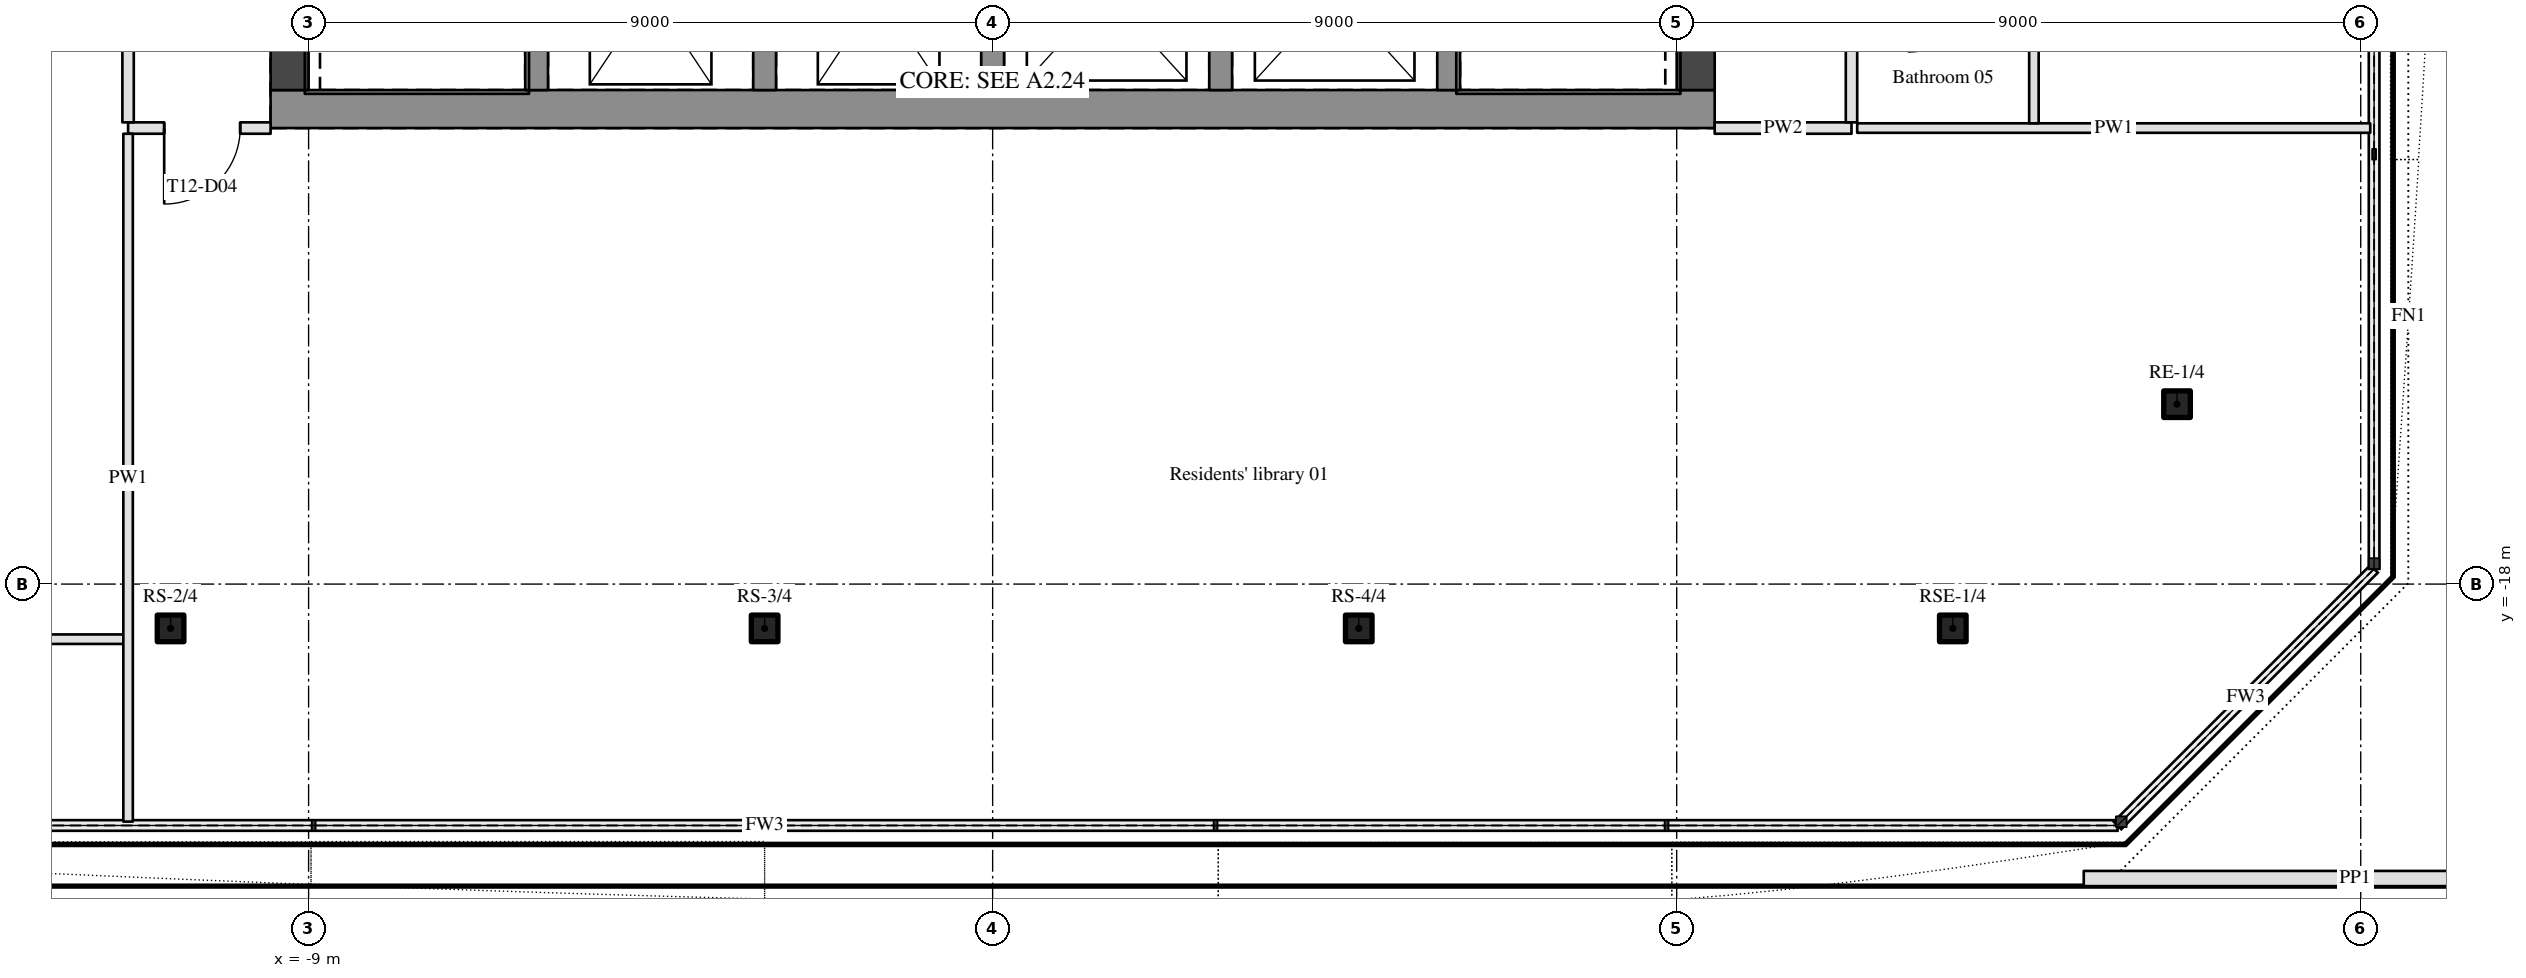
"""IFC4 building model, lengths in metres.
Left out: names, types, materials, properties, quantities, classifications, styles, units other than length and angle.
Written with IfcOpenShell. Run it as: python <this file> out.ifc"""

import sys

from ifc_helpers import new_model, si_unit, direction, frame, frame_2d, origin, origin_2d, place, context, subcontext, project, spatial, rectangle, hollow_rectangle, extrude, element, fill, save


model = new_model("IFC4")
c1 = context("Model", 3, precision=1e-05, world=origin(), true_north=direction((0.0, 1.0)))
c2 = subcontext(c1, "Body", "Model", "MODEL_VIEW")
j1 = project(units=[si_unit("LENGTHUNIT", "METRE"), si_unit("PLANEANGLEUNIT", "RADIAN")], contexts=[c1])
p1 = place(None, origin())
s1 = spatial("IfcSite", under=j1, at=p1, CompositionType="ELEMENT")
p2 = place(p1, origin())
s2 = spatial("IfcBuilding", under=s1, at=p2, CompositionType="ELEMENT")
p3 = place(p2, frame((0.0, 0.0, 172.2)))
s3 = spatial("IfcBuildingStorey", under=s2, at=p3, CompositionType="ELEMENT", Elevation=172.2)
for number, where, z_axis, x_axis in (
    (1, (-10.816, -18.583, 0.0), (0.0, 0.0, 1.0), (1.0, 0.0, 0.0)),
    (2, (-3.0, -18.583, 0.0), (0.0, 0.0, 1.0), (1.0, 0.0, 0.0)),
    (3, (4.817, -18.583, 0.0), (0.0, 0.0, 1.0), (1.0, 0.0, 0.0)),
    (4, (12.633, -18.583, 0.0), (0.0, 0.0, 1.0), (1.0, 0.0, 0.0)),
    (5, (15.583, -15.633, 0.0), (0.0, 0.0, 1.0), (1.0, 0.0, 0.0)),
):
    element("IfcColumn", number, at=place(p3, frame(where, z_axis=z_axis, x_axis=x_axis)), inside=s3, PredefinedType="COLUMN", context=c2, shape_type="SweptSolid", body=[
        extrude(hollow_rectangle(XDim=0.35, YDim=0.35, WallThickness=0.02, InnerFilletRadius=0.03, OuterFilletRadius=0.05, at=origin_2d()), origin(), (0.0, 0.0, 1.0), 3.15),
    ])
p4 = place(p3, frame((-9.5, -11.75, 0.0), z_axis=(0.0, 0.0, 1.0), x_axis=(1.0, 0.0, 0.0)))
e6 = element("IfcWall", 6, at=p4, inside=s3, PredefinedType="SHEAR", context=c2, shape_type="SweptSolid", body=[
    extrude(rectangle(XDim=19.0, YDim=0.5, at=frame_2d((9.5, 0.0))), origin(), (0.0, 0.0, 1.0), 3.15),
])
p5 = place(p3, frame((-9.25, -11.5, 0.0), z_axis=(0.0, 0.0, 1.0), x_axis=(0.0, 1.0, 0.0)))
e7 = element("IfcWall", 7, at=p5, inside=s3, PredefinedType="SHEAR", context=c2, shape_type="SweptSolid", body=[
    extrude(rectangle(XDim=11.65, YDim=0.5, at=frame_2d((5.825, 0.0))), origin(), (0.0, 0.0, 1.0), 3.15),
])
p6 = place(p5, frame((9.4, 0.0, 0.0)))
e8 = element("IfcOpeningElement", 8, at=p6, cuts=e7, PredefinedType="OPENING", context=c2, shape_type="SweptSolid", body=[
    extrude(rectangle(XDim=1.8, YDim=2.1, at=frame_2d((0.9, 1.05))), frame((0.0, 0.26, 0.0), z_axis=(0.0, -1.0, 0.0), x_axis=(1.0, 0.0, 0.0)), (0.0, 0.0, 1.0), 0.52),
])
p7 = place(p3, frame((9.25, -11.5, 0.0), z_axis=(0.0, 0.0, 1.0), x_axis=(0.0, 1.0, 0.0)))
e9 = element("IfcWall", 9, at=p7, inside=s3, PredefinedType="SHEAR", context=c2, shape_type="SweptSolid", body=[
    extrude(rectangle(XDim=11.65, YDim=0.5, at=frame_2d((5.825, 0.0))), origin(), (0.0, 0.0, 1.0), 3.15),
])
p8 = place(p7, frame((9.4, 0.0, 0.0)))
e10 = element("IfcOpeningElement", 10, at=p8, cuts=e9, PredefinedType="OPENING", context=c2, shape_type="SweptSolid", body=[
    extrude(rectangle(XDim=1.8, YDim=2.1, at=frame_2d((0.9, 1.05))), frame((0.0, 0.26, 0.0), z_axis=(0.0, -1.0, 0.0), x_axis=(1.0, 0.0, 0.0)), (0.0, 0.0, 1.0), 0.52),
])
p9 = place(p3, frame((14.356, -21.874, 0.0), z_axis=(0.0, 0.0, 1.0), x_axis=(1.0, 0.0, 0.0)))
e11 = element("IfcWall", 11, at=p9, inside=s3, PredefinedType="PARAPET", context=c2, shape_type="SweptSolid", body=[
    extrude(rectangle(XDim=7.14, YDim=0.2, at=frame_2d((3.57, 0.0))), origin(), (0.0, 0.0, 1.0), 1.0),
])
p10 = place(p3, frame((-11.438, -18.725, 0.0), z_axis=(0.0, 0.0, 1.0), x_axis=(-1.0, 0.0, 0.0)))
e12 = element("IfcWall", 12, at=p10, inside=s3, PredefinedType="PARTITIONING", context=c2, shape_type="SweptSolid", body=[
    extrude(rectangle(XDim=6.5, YDim=0.125, at=frame_2d((3.25, 0.0))), origin(), (0.0, 0.0, 1.0), 2.21),
])
p11 = place(p10, frame((2.8, 0.0, 0.0)))
e13 = element("IfcOpeningElement", 13, at=p11, cuts=e12, PredefinedType="OPENING", context=c2, shape_type="SweptSolid", body=[
    extrude(rectangle(XDim=0.9, YDim=2.1, at=frame_2d((0.45, 1.05))), frame((0.0, 0.073, 0.0), z_axis=(0.0, -1.0, 0.0), x_axis=(1.0, 0.0, 0.0)), (0.0, 0.0, 1.0), 0.145),
])
p12 = place(p3, frame((-9.5, -12.0, 0.0), z_axis=(0.0, 0.0, 1.0), x_axis=(-1.0, 0.0, 0.0)))
e14 = element("IfcWall", 14, at=p12, inside=s3, PredefinedType="PARTITIONING", context=c2, shape_type="SweptSolid", body=[
    extrude(rectangle(XDim=1.875, YDim=0.15, at=frame_2d((0.938, 0.0))), origin(), (0.0, 0.0, 1.0), 2.21),
])
p13 = place(p12, frame((0.4, 0.0, 0.0)))
e15 = element("IfcOpeningElement", 15, at=p13, cuts=e14, PredefinedType="OPENING", context=c2, shape_type="SweptSolid", body=[
    extrude(rectangle(XDim=1.0, YDim=2.1, at=frame_2d((0.5, 1.05))), frame((0.0, 0.085, 0.0), z_axis=(0.0, -1.0, 0.0), x_axis=(1.0, 0.0, 0.0)), (0.0, 0.0, 1.0), 0.17),
])
p14 = place(p3, frame((9.5, -12.0, 0.0), z_axis=(0.0, 0.0, 1.0), x_axis=(1.0, 0.0, 0.0)))
e16 = element("IfcWall", 16, at=p14, inside=s3, PredefinedType="PARTITIONING", context=c2, shape_type="SweptSolid", body=[
    extrude(rectangle(XDim=1.8, YDim=0.15, at=frame_2d((0.9, 0.0))), origin(), (0.0, 0.0, 1.0), 2.21),
])
p15 = place(p3, frame((11.375, -12.0, 0.0), z_axis=(0.0, 0.0, 1.0), x_axis=(1.0, 0.0, 0.0)))
e17 = element("IfcWall", 17, at=p15, inside=s3, PredefinedType="PARTITIONING", context=c2, shape_type="SweptSolid", body=[
    extrude(rectangle(XDim=6.75, YDim=0.125, at=frame_2d((3.375, 0.0))), origin(), (0.0, 0.0, 1.0), 2.21),
])
p16 = place(p3, frame((-11.375, -21.125, 0.0), z_axis=(0.0, 0.0, 1.0), x_axis=(0.0, 1.0, 0.0)))
e18 = element("IfcWall", 18, at=p16, inside=s3, PredefinedType="PARTITIONING", context=c2, shape_type="SweptSolid", body=[
    extrude(rectangle(XDim=9.05, YDim=0.125, at=frame_2d((4.525, 0.0))), origin(), (0.0, 0.0, 1.0), 2.21),
])
p17 = place(p3, frame((-11.375, -11.925, 0.0), z_axis=(0.0, 0.0, 1.0), x_axis=(0.0, 1.0, 0.0)))
e19 = element("IfcWall", 19, at=p17, inside=s3, PredefinedType="PARTITIONING", context=c2, shape_type="SweptSolid", body=[
    extrude(rectangle(XDim=23.25, YDim=0.15, at=frame_2d((11.625, 0.0))), origin(), (0.0, 0.0, 1.0), 2.21),
])
p18 = place(p17, frame((1.067, 0.0, 0.0)))
e20 = element("IfcOpeningElement", 20, at=p18, cuts=e19, PredefinedType="OPENING", context=c2, shape_type="SweptSolid", body=[
    extrude(rectangle(XDim=1.0, YDim=2.1, at=frame_2d((0.5, 1.05))), frame((0.0, 0.085, 0.0), z_axis=(0.0, -1.0, 0.0), x_axis=(1.0, 0.0, 0.0)), (0.0, 0.0, 1.0), 0.17),
])
p19 = place(p17, frame((19.01, 0.0, 0.0)))
e21 = element("IfcOpeningElement", 21, at=p19, cuts=e19, PredefinedType="OPENING", context=c2, shape_type="SweptSolid", body=[
    extrude(rectangle(XDim=1.0, YDim=2.1, at=frame_2d((0.5, 1.05))), frame((0.0, 0.085, 0.0), z_axis=(0.0, -1.0, 0.0), x_axis=(1.0, 0.0, 0.0)), (0.0, 0.0, 1.0), 0.17),
])
p20 = place(p3, frame((-6.0, -11.5, 0.0), z_axis=(0.0, 0.0, 1.0), x_axis=(0.0, 1.0, 0.0)))
e22 = element("IfcWall", 22, at=p20, inside=s3, PredefinedType="SHEAR", context=c2, shape_type="SweptSolid", body=[
    extrude(rectangle(XDim=6.4, YDim=0.3, at=frame_2d((3.2, 0.0))), origin(), (0.0, 0.0, 1.0), 3.15),
])
p21 = place(p20, frame((5.15, 0.0, 0.0)))
e23 = element("IfcOpeningElement", 23, at=p21, cuts=e22, PredefinedType="OPENING", context=c2, shape_type="SweptSolid", body=[
    extrude(rectangle(XDim=1.1, YDim=2.1, at=frame_2d((0.55, 1.05))), frame((0.0, 0.16, 0.0), z_axis=(0.0, -1.0, 0.0), x_axis=(1.0, 0.0, 0.0)), (0.0, 0.0, 1.0), 0.32),
])
for number, where, z_axis, x_axis in (
    (24, (-3.0, -11.5, 0.0), (0.0, 0.0, 1.0), (0.0, 1.0, 0.0)),
    (25, (0.0, -11.5, 0.0), (0.0, 0.0, 1.0), (0.0, 1.0, 0.0)),
    (26, (3.0, -11.5, 0.0), (0.0, 0.0, 1.0), (0.0, 1.0, 0.0)),
):
    element("IfcWall", number, at=place(p3, frame(where, z_axis=z_axis, x_axis=x_axis)), inside=s3, PredefinedType="SHEAR", context=c2, shape_type="SweptSolid", body=[
        extrude(rectangle(XDim=2.4, YDim=0.3, at=frame_2d((1.2, 0.0))), origin(), (0.0, 0.0, 1.0), 3.15),
    ])
p22 = place(p3, frame((6.0, -5.1, 0.0), z_axis=(0.0, 0.0, 1.0), x_axis=(0.0, -1.0, 0.0)))
e27 = element("IfcWall", 27, at=p22, inside=s3, PredefinedType="SHEAR", context=c2, shape_type="SweptSolid", body=[
    extrude(rectangle(XDim=6.4, YDim=0.3, at=frame_2d((3.2, 0.0))), origin(), (0.0, 0.0, 1.0), 3.15),
])
p23 = place(p22, frame((0.15, 0.0, 0.0)))
e28 = element("IfcOpeningElement", 28, at=p23, cuts=e27, PredefinedType="OPENING", context=c2, shape_type="SweptSolid", body=[
    extrude(rectangle(XDim=1.1, YDim=2.1, at=frame_2d((0.55, 1.05))), frame((0.0, 0.16, 0.0), z_axis=(0.0, -1.0, 0.0), x_axis=(1.0, 0.0, 0.0)), (0.0, 0.0, 1.0), 0.32),
])
p24 = place(p3, frame((11.3, 11.225, 0.0), z_axis=(0.0, 0.0, 1.0), x_axis=(0.0, -1.0, 0.0)))
e29 = element("IfcWall", 29, at=p24, inside=s3, PredefinedType="PARTITIONING", context=c2, shape_type="SweptSolid", body=[
    extrude(rectangle(XDim=23.15, YDim=0.15, at=frame_2d((11.575, 0.0))), origin(), (0.0, 0.0, 1.0), 2.21),
])
p25 = place(p24, frame((10.988, 0.0, 0.0)))
e30 = element("IfcOpeningElement", 30, at=p25, cuts=e29, PredefinedType="OPENING", context=c2, shape_type="SweptSolid", body=[
    extrude(rectangle(XDim=1.0, YDim=2.1, at=frame_2d((0.5, 1.05))), frame((0.0, 0.085, 0.0), z_axis=(0.0, -1.0, 0.0), x_axis=(1.0, 0.0, 0.0)), (0.0, 0.0, 1.0), 0.17),
])
p26 = place(p3, frame((13.7, -4.363, 0.0), z_axis=(0.0, 0.0, 1.0), x_axis=(0.0, -1.0, 0.0)))
e31 = element("IfcWall", 31, at=p26, inside=s3, PredefinedType="PARTITIONING", context=c2, shape_type="SweptSolid", body=[
    extrude(rectangle(XDim=7.575, YDim=0.125, at=frame_2d((3.788, 0.0))), origin(), (0.0, 0.0, 1.0), 2.21),
])
p27 = place(p26, frame((4.595, 0.0, 0.0)))
e32 = element("IfcOpeningElement", 32, at=p27, cuts=e31, PredefinedType="OPENING", context=c2, shape_type="SweptSolid", body=[
    extrude(rectangle(XDim=0.9, YDim=2.1, at=frame_2d((0.45, 1.05))), frame((0.0, 0.073, 0.0), z_axis=(0.0, -1.0, 0.0), x_axis=(1.0, 0.0, 0.0)), (0.0, 0.0, 1.0), 0.145),
])
p28 = place(p26, frame((1.695, 0.0, 0.0)))
e33 = element("IfcOpeningElement", 33, at=p28, cuts=e31, PredefinedType="OPENING", context=c2, shape_type="SweptSolid", body=[
    extrude(rectangle(XDim=0.9, YDim=2.1, at=frame_2d((0.45, 1.05))), frame((0.0, 0.073, 0.0), z_axis=(0.0, -1.0, 0.0), x_axis=(1.0, 0.0, 0.0)), (0.0, 0.0, 1.0), 0.145),
])
p29 = place(p13, origin())
e34 = element("IfcDoor", 34, at=p29, inside=s3, OperationType="SINGLE_SWING_RIGHT", PredefinedType="DOOR", context=c2, shape_type="SweptSolid", body=[
    extrude(rectangle(XDim=1.0, YDim=2.1, at=frame_2d((0.5, 1.05))), frame((0.0, 0.025, 0.0), z_axis=(0.0, -1.0, 0.0), x_axis=(1.0, 0.0, 0.0)), (0.0, 0.0, 1.0), 0.05),
])
fill(e15, e34)
save(model, sys.argv[1])
